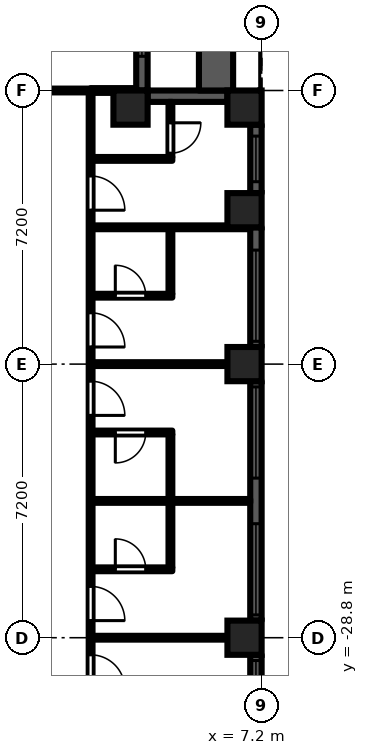
"""IFC4 building model, lengths in metres.
Left out: names, types, materials, properties, quantities, classifications, styles, units other than length and angle.
Written with IfcOpenShell. Run it as: python <this file> out.ifc"""

import sys

from ifc_helpers import new_model, si_unit, direction, frame, frame_2d, origin, origin_2d, place, context, subcontext, project, spatial, rectangle, extrude, element, fill, save


model = new_model("IFC4")
c1 = context("Model", 3, precision=1e-05, world=origin(), true_north=direction((0.0, 1.0)))
c2 = subcontext(c1, "Body", "Model", "MODEL_VIEW")
j1 = project(units=[si_unit("LENGTHUNIT", "METRE"), si_unit("PLANEANGLEUNIT", "RADIAN")], contexts=[c1])
p1 = place(None, origin())
s1 = spatial("IfcSite", under=j1, at=p1, CompositionType="ELEMENT")
p2 = place(p1, origin())
s2 = spatial("IfcBuilding", under=s1, at=p2, CompositionType="ELEMENT")
p3 = place(p2, frame((0.0, 0.0, 93.9)))
s3 = spatial("IfcBuildingStorey", under=s2, at=p3, CompositionType="ELEMENT", Elevation=93.9)
for number, where, z_axis, x_axis in (
    (1, (3.75, -14.85, 0.0), (0.0, 0.0, 1.0), (1.0, 0.0, 0.0)),
    (2, (6.75, -28.8, 0.0), (0.0, 0.0, 1.0), (1.0, 0.0, 0.0)),
    (3, (6.75, -21.6, 0.0), (0.0, 0.0, 1.0), (1.0, 0.0, 0.0)),
    (4, (6.75, -17.55, 0.0), (0.0, 0.0, 1.0), (1.0, 0.0, 0.0)),
    (5, (6.75, -14.85, 0.0), (0.0, 0.0, 1.0), (1.0, 0.0, 0.0)),
):
    element("IfcColumn", number, at=place(p3, frame(where, z_axis=z_axis, x_axis=x_axis)), inside=s3, PredefinedType="COLUMN", context=c2, shape_type="SweptSolid", body=[
        extrude(rectangle(XDim=0.9, YDim=0.9, at=origin_2d()), origin(), (0.0, 0.0, 1.0), 3.0),
    ])
p4 = place(p3, frame((7.05, -35.55, 0.0), z_axis=(0.0, 0.0, 1.0), x_axis=(0.0, 1.0, 0.0)))
e6 = element("IfcWall", 6, at=p4, inside=s3, PredefinedType="SOLIDWALL", context=c2, shape_type="SweptSolid", body=[
    extrude(rectangle(XDim=6.3, YDim=0.3, at=frame_2d((3.15, 0.0))), origin(), (0.0, 0.0, 1.0), 2.1),
])
p5 = place(p4, frame((3.75, 0.0, 0.2)))
e7 = element("IfcOpeningElement", 7, at=p5, cuts=e6, PredefinedType="OPENING", context=c2, shape_type="SweptSolid", body=[
    extrude(rectangle(XDim=2.4, YDim=1.85, at=frame_2d((1.2, 0.925))), frame((0.0, 0.16, 0.0), z_axis=(0.0, -1.0, 0.0), x_axis=(1.0, 0.0, 0.0)), (0.0, 0.0, 1.0), 0.32),
])
p6 = place(p3, frame((7.05, -28.35, 0.0), z_axis=(0.0, 0.0, 1.0), x_axis=(0.0, 1.0, 0.0)))
e8 = element("IfcWall", 8, at=p6, inside=s3, PredefinedType="SOLIDWALL", context=c2, shape_type="SweptSolid", body=[
    extrude(rectangle(XDim=6.3, YDim=0.3, at=frame_2d((3.15, 0.0))), origin(), (0.0, 0.0, 1.0), 2.1),
])
p7 = place(p6, frame((0.15, 0.0, 0.2)))
e9 = element("IfcOpeningElement", 9, at=p7, cuts=e8, PredefinedType="OPENING", context=c2, shape_type="SweptSolid", body=[
    extrude(rectangle(XDim=2.4, YDim=1.85, at=frame_2d((1.2, 0.925))), frame((0.0, 0.16, 0.0), z_axis=(0.0, -1.0, 0.0), x_axis=(1.0, 0.0, 0.0)), (0.0, 0.0, 1.0), 0.32),
])
p8 = place(p6, frame((3.75, 0.0, 0.2)))
e10 = element("IfcOpeningElement", 10, at=p8, cuts=e8, PredefinedType="OPENING", context=c2, shape_type="SweptSolid", body=[
    extrude(rectangle(XDim=2.4, YDim=1.85, at=frame_2d((1.2, 0.925))), frame((0.0, 0.16, 0.0), z_axis=(0.0, -1.0, 0.0), x_axis=(1.0, 0.0, 0.0)), (0.0, 0.0, 1.0), 0.32),
])
p9 = place(p3, frame((7.05, -21.15, 0.0), z_axis=(0.0, 0.0, 1.0), x_axis=(0.0, 1.0, 0.0)))
e11 = element("IfcWall", 11, at=p9, inside=s3, PredefinedType="SOLIDWALL", context=c2, shape_type="SweptSolid", body=[
    extrude(rectangle(XDim=3.15, YDim=0.3, at=frame_2d((1.575, 0.0))), origin(), (0.0, 0.0, 1.0), 2.1),
])
p10 = place(p9, frame((0.15, 0.0, 0.2)))
e12 = element("IfcOpeningElement", 12, at=p10, cuts=e11, PredefinedType="OPENING", context=c2, shape_type="SweptSolid", body=[
    extrude(rectangle(XDim=2.4, YDim=1.85, at=frame_2d((1.2, 0.925))), frame((0.0, 0.16, 0.0), z_axis=(0.0, -1.0, 0.0), x_axis=(1.0, 0.0, 0.0)), (0.0, 0.0, 1.0), 0.32),
])
p11 = place(p3, frame((7.05, -17.1, 0.0), z_axis=(0.0, 0.0, 1.0), x_axis=(0.0, 1.0, 0.0)))
e13 = element("IfcWall", 13, at=p11, inside=s3, PredefinedType="SOLIDWALL", context=c2, shape_type="SweptSolid", body=[
    extrude(rectangle(XDim=1.8, YDim=0.3, at=frame_2d((0.9, 0.0))), origin(), (0.0, 0.0, 1.0), 2.1),
])
p12 = place(p11, frame((0.3, 0.0, 0.2)))
e14 = element("IfcOpeningElement", 14, at=p12, cuts=e13, PredefinedType="OPENING", context=c2, shape_type="SweptSolid", body=[
    extrude(rectangle(XDim=1.2, YDim=1.85, at=frame_2d((0.6, 0.925))), frame((0.0, 0.16, 0.0), z_axis=(0.0, -1.0, 0.0), x_axis=(1.0, 0.0, 0.0)), (0.0, 0.0, 1.0), 0.32),
])
p13 = place(p3, frame((6.3, -14.55, 0.0), z_axis=(0.0, 0.0, 1.0), x_axis=(-1.0, 0.0, 0.0)))
e15 = element("IfcWall", 15, at=p13, inside=s3, PredefinedType="SOLIDWALL", context=c2, shape_type="SweptSolid", body=[
    extrude(rectangle(XDim=2.1, YDim=0.3, at=frame_2d((1.05, 0.0))), origin(), (0.0, 0.0, 1.0), 2.1),
])
p14 = place(p3, frame((4.05, -14.4, 0.0), z_axis=(0.0, 0.0, 1.0), x_axis=(0.0, 1.0, 0.0)))
e16 = element("IfcWall", 16, at=p14, inside=s3, PredefinedType="SOLIDWALL", context=c2, shape_type="SweptSolid", body=[
    extrude(rectangle(XDim=7.2, YDim=0.3, at=frame_2d((3.6, 0.0))), origin(), (0.0, 0.0, 1.0), 2.1),
])
p15 = place(p14, frame((3.0, 0.0, 0.0)))
e17 = element("IfcOpeningElement", 17, at=p15, cuts=e16, PredefinedType="OPENING", context=c2, shape_type="SweptSolid", body=[
    extrude(rectangle(XDim=1.2, YDim=2.05, at=frame_2d((0.6, 1.025))), frame((0.0, 0.16, 0.0), z_axis=(0.0, -1.0, 0.0), x_axis=(1.0, 0.0, 0.0)), (0.0, 0.0, 1.0), 0.32),
])
p16 = place(p14, frame((0.9, 0.0, 0.2)))
e18 = element("IfcOpeningElement", 18, at=p16, cuts=e16, PredefinedType="OPENING", context=c2, shape_type="SweptSolid", body=[
    extrude(rectangle(XDim=1.8, YDim=1.85, at=frame_2d((0.9, 0.925))), frame((0.0, 0.16, 0.0), z_axis=(0.0, -1.0, 0.0), x_axis=(1.0, 0.0, 0.0)), (0.0, 0.0, 1.0), 0.32),
])
p17 = place(p14, frame((4.5, 0.0, 0.2)))
e19 = element("IfcOpeningElement", 19, at=p17, cuts=e16, PredefinedType="OPENING", context=c2, shape_type="SweptSolid", body=[
    extrude(rectangle(XDim=1.8, YDim=1.85, at=frame_2d((0.9, 0.925))), frame((0.0, 0.16, 0.0), z_axis=(0.0, -1.0, 0.0), x_axis=(1.0, 0.0, 0.0)), (0.0, 0.0, 1.0), 0.32),
])
p18 = place(p3, frame((6.0, -14.4, 0.0), z_axis=(0.0, 0.0, 1.0), x_axis=(0.0, 1.0, 0.0)))
e20 = element("IfcWall", 20, at=p18, inside=s3, PredefinedType="PARAPET", context=c2, shape_type="SweptSolid", body=[
    extrude(rectangle(XDim=7.2, YDim=0.9, at=frame_2d((3.6, 0.0))), origin(), (0.0, 0.0, 1.0), 0.8),
])
p19 = place(p3, frame((1.275, -14.4, 0.0), z_axis=(0.0, 0.0, 1.0), x_axis=(1.0, 0.0, 0.0)))
e21 = element("IfcWall", 21, at=p19, inside=s3, PredefinedType="PARTITIONING", context=c2, shape_type="SweptSolid", body=[
    extrude(rectangle(XDim=1.425, YDim=0.1, at=frame_2d((0.712, 0.0))), origin(), (0.0, 0.0, 1.0), 2.575),
])
p20 = place(p3, frame((2.7, -32.35, 0.0), z_axis=(0.0, 0.0, 1.0), x_axis=(0.0, 1.0, 0.0)))
e22 = element("IfcWall", 22, at=p20, inside=s3, PredefinedType="PARTITIONING", context=c2, shape_type="SweptSolid", body=[
    extrude(rectangle(XDim=17.888, YDim=0.1, at=frame_2d((8.944, 0.0))), origin(), (0.0, 0.0, 1.0), 2.575),
])
p21 = place(p20, frame((2.2, 0.0, 0.0)))
e23 = element("IfcOpeningElement", 23, at=p21, cuts=e22, PredefinedType="OPENING", context=c2, shape_type="SweptSolid", body=[
    extrude(rectangle(XDim=0.9, YDim=2.1, at=frame_2d((0.45, 1.05))), frame((0.0, 0.06, 0.0), z_axis=(0.0, -1.0, 0.0), x_axis=(1.0, 0.0, 0.0)), (0.0, 0.0, 1.0), 0.12),
])
p22 = place(p20, frame((4.0, 0.0, 0.0)))
e24 = element("IfcOpeningElement", 24, at=p22, cuts=e22, PredefinedType="OPENING", context=c2, shape_type="SweptSolid", body=[
    extrude(rectangle(XDim=0.9, YDim=2.1, at=frame_2d((0.45, 1.05))), frame((0.0, 0.06, 0.0), z_axis=(0.0, -1.0, 0.0), x_axis=(1.0, 0.0, 0.0)), (0.0, 0.0, 1.0), 0.12),
])
p23 = place(p20, frame((9.4, 0.0, 0.0)))
e25 = element("IfcOpeningElement", 25, at=p23, cuts=e22, PredefinedType="OPENING", context=c2, shape_type="SweptSolid", body=[
    extrude(rectangle(XDim=0.9, YDim=2.1, at=frame_2d((0.45, 1.05))), frame((0.0, 0.06, 0.0), z_axis=(0.0, -1.0, 0.0), x_axis=(1.0, 0.0, 0.0)), (0.0, 0.0, 1.0), 0.12),
])
p24 = place(p20, frame((11.2, 0.0, 0.0)))
e26 = element("IfcOpeningElement", 26, at=p24, cuts=e22, PredefinedType="OPENING", context=c2, shape_type="SweptSolid", body=[
    extrude(rectangle(XDim=0.9, YDim=2.1, at=frame_2d((0.45, 1.05))), frame((0.0, 0.06, 0.0), z_axis=(0.0, -1.0, 0.0), x_axis=(1.0, 0.0, 0.0)), (0.0, 0.0, 1.0), 0.12),
])
p25 = place(p20, frame((14.8, 0.0, 0.0)))
e27 = element("IfcOpeningElement", 27, at=p25, cuts=e22, PredefinedType="OPENING", context=c2, shape_type="SweptSolid", body=[
    extrude(rectangle(XDim=0.9, YDim=2.1, at=frame_2d((0.45, 1.05))), frame((0.0, 0.06, 0.0), z_axis=(0.0, -1.0, 0.0), x_axis=(1.0, 0.0, 0.0)), (0.0, 0.0, 1.0), 0.12),
])
p26 = place(p3, frame((2.75, -28.8, 0.0), z_axis=(0.0, 0.0, 1.0), x_axis=(1.0, 0.0, 0.0)))
e28 = element("IfcWall", 28, at=p26, inside=s3, PredefinedType="PARTITIONING", context=c2, shape_type="SweptSolid", body=[
    extrude(rectangle(XDim=4.15, YDim=0.1, at=frame_2d((2.075, 0.0))), origin(), (0.0, 0.0, 1.0), 2.575),
])
p27 = place(p3, frame((2.75, -27.0, 0.0), z_axis=(0.0, 0.0, 1.0), x_axis=(1.0, 0.0, 0.0)))
e29 = element("IfcWall", 29, at=p27, inside=s3, PredefinedType="PARTITIONING", context=c2, shape_type="SweptSolid", body=[
    extrude(rectangle(XDim=2.1, YDim=0.1, at=frame_2d((1.05, 0.0))), origin(), (0.0, 0.0, 1.0), 2.575),
])
p28 = place(p27, frame((0.6, 0.0, 0.0)))
e30 = element("IfcOpeningElement", 30, at=p28, cuts=e29, PredefinedType="OPENING", context=c2, shape_type="SweptSolid", body=[
    extrude(rectangle(XDim=0.8, YDim=2.1, at=frame_2d((0.4, 1.05))), frame((0.0, 0.06, 0.0), z_axis=(0.0, -1.0, 0.0), x_axis=(1.0, 0.0, 0.0)), (0.0, 0.0, 1.0), 0.12),
])
p29 = place(p3, frame((2.75, -25.2, 0.0), z_axis=(0.0, 0.0, 1.0), x_axis=(1.0, 0.0, 0.0)))
e31 = element("IfcWall", 31, at=p29, inside=s3, PredefinedType="PARTITIONING", context=c2, shape_type="SweptSolid", body=[
    extrude(rectangle(XDim=4.15, YDim=0.1, at=frame_2d((2.075, 0.0))), origin(), (0.0, 0.0, 1.0), 2.575),
])
p30 = place(p3, frame((2.75, -23.4, 0.0), z_axis=(0.0, 0.0, 1.0), x_axis=(1.0, 0.0, 0.0)))
e32 = element("IfcWall", 32, at=p30, inside=s3, PredefinedType="PARTITIONING", context=c2, shape_type="SweptSolid", body=[
    extrude(rectangle(XDim=2.1, YDim=0.1, at=frame_2d((1.05, 0.0))), origin(), (0.0, 0.0, 1.0), 2.575),
])
p31 = place(p30, frame((0.6, 0.0, 0.0)))
e33 = element("IfcOpeningElement", 33, at=p31, cuts=e32, PredefinedType="OPENING", context=c2, shape_type="SweptSolid", body=[
    extrude(rectangle(XDim=0.8, YDim=2.1, at=frame_2d((0.4, 1.05))), frame((0.0, 0.06, 0.0), z_axis=(0.0, -1.0, 0.0), x_axis=(1.0, 0.0, 0.0)), (0.0, 0.0, 1.0), 0.12),
])
p32 = place(p3, frame((2.75, -21.6, 0.0), z_axis=(0.0, 0.0, 1.0), x_axis=(1.0, 0.0, 0.0)))
e34 = element("IfcWall", 34, at=p32, inside=s3, PredefinedType="PARTITIONING", context=c2, shape_type="SweptSolid", body=[
    extrude(rectangle(XDim=4.15, YDim=0.1, at=frame_2d((2.075, 0.0))), origin(), (0.0, 0.0, 1.0), 2.575),
])
p33 = place(p3, frame((2.75, -19.8, 0.0), z_axis=(0.0, 0.0, 1.0), x_axis=(1.0, 0.0, 0.0)))
e35 = element("IfcWall", 35, at=p33, inside=s3, PredefinedType="PARTITIONING", context=c2, shape_type="SweptSolid", body=[
    extrude(rectangle(XDim=2.1, YDim=0.1, at=frame_2d((1.05, 0.0))), origin(), (0.0, 0.0, 1.0), 2.575),
])
p34 = place(p33, frame((0.6, 0.0, 0.0)))
e36 = element("IfcOpeningElement", 36, at=p34, cuts=e35, PredefinedType="OPENING", context=c2, shape_type="SweptSolid", body=[
    extrude(rectangle(XDim=0.8, YDim=2.1, at=frame_2d((0.4, 1.05))), frame((0.0, 0.06, 0.0), z_axis=(0.0, -1.0, 0.0), x_axis=(1.0, 0.0, 0.0)), (0.0, 0.0, 1.0), 0.12),
])
p35 = place(p3, frame((2.75, -18.0, 0.0), z_axis=(0.0, 0.0, 1.0), x_axis=(1.0, 0.0, 0.0)))
e37 = element("IfcWall", 37, at=p35, inside=s3, PredefinedType="PARTITIONING", context=c2, shape_type="SweptSolid", body=[
    extrude(rectangle(XDim=4.15, YDim=0.1, at=frame_2d((2.075, 0.0))), origin(), (0.0, 0.0, 1.0), 2.575),
])
p36 = place(p3, frame((2.75, -16.2, 0.0), z_axis=(0.0, 0.0, 1.0), x_axis=(1.0, 0.0, 0.0)))
e38 = element("IfcWall", 38, at=p36, inside=s3, PredefinedType="PARTITIONING", context=c2, shape_type="SweptSolid", body=[
    extrude(rectangle(XDim=2.1, YDim=0.1, at=frame_2d((1.05, 0.0))), origin(), (0.0, 0.0, 1.0), 2.575),
])
p37 = place(p3, frame((2.7, -14.4, 0.0), z_axis=(0.0, 0.0, 1.0), x_axis=(1.0, 0.0, 0.0)))
e39 = element("IfcWall", 39, at=p37, inside=s3, PredefinedType="PARTITIONING", context=c2, shape_type="SweptSolid", body=[
    extrude(rectangle(XDim=1.2, YDim=0.125, at=frame_2d((0.6, 0.0))), origin(), (0.0, 0.0, 1.0), 2.575),
])
p38 = place(p3, frame((4.8, -26.95, 0.0), z_axis=(0.0, 0.0, 1.0), x_axis=(0.0, 1.0, 0.0)))
e40 = element("IfcWall", 40, at=p38, inside=s3, PredefinedType="PARTITIONING", context=c2, shape_type="SweptSolid", body=[
    extrude(rectangle(XDim=3.5, YDim=0.1, at=frame_2d((1.75, 0.0))), origin(), (0.0, 0.0, 1.0), 2.575),
])
p39 = place(p3, frame((4.8, -19.75, 0.0), z_axis=(0.0, 0.0, 1.0), x_axis=(0.0, 1.0, 0.0)))
e41 = element("IfcWall", 41, at=p39, inside=s3, PredefinedType="PARTITIONING", context=c2, shape_type="SweptSolid", body=[
    extrude(rectangle(XDim=1.7, YDim=0.1, at=frame_2d((0.85, 0.0))), origin(), (0.0, 0.0, 1.0), 2.575),
])
p40 = place(p3, frame((4.8, -16.15, 0.0), z_axis=(0.0, 0.0, 1.0), x_axis=(0.0, 1.0, 0.0)))
e42 = element("IfcWall", 42, at=p40, inside=s3, PredefinedType="PARTITIONING", context=c2, shape_type="SweptSolid", body=[
    extrude(rectangle(XDim=1.45, YDim=0.1, at=frame_2d((0.725, 0.0))), origin(), (0.0, 0.0, 1.0), 2.575),
])
p41 = place(p40, frame((0.1, 0.0, 0.0)))
e43 = element("IfcOpeningElement", 43, at=p41, cuts=e42, PredefinedType="OPENING", context=c2, shape_type="SweptSolid", body=[
    extrude(rectangle(XDim=0.8, YDim=2.1, at=frame_2d((0.4, 1.05))), frame((0.0, 0.06, 0.0), z_axis=(0.0, -1.0, 0.0), x_axis=(1.0, 0.0, 0.0)), (0.0, 0.0, 1.0), 0.12),
])
p42 = place(p5, origin())
e44 = element("IfcWindow", 44, at=p42, inside=s3, PartitioningType="SINGLE_PANEL", PredefinedType="WINDOW", context=c2, shape_type="SweptSolid", body=[
    extrude(rectangle(XDim=2.4, YDim=1.85, at=frame_2d((1.2, 0.925))), frame((0.0, 0.03, 0.0), z_axis=(0.0, -1.0, 0.0), x_axis=(1.0, 0.0, 0.0)), (0.0, 0.0, 1.0), 0.06),
])
fill(e7, e44)
p43 = place(p7, origin())
e45 = element("IfcWindow", 45, at=p43, inside=s3, PartitioningType="SINGLE_PANEL", PredefinedType="WINDOW", context=c2, shape_type="SweptSolid", body=[
    extrude(rectangle(XDim=2.4, YDim=1.85, at=frame_2d((1.2, 0.925))), frame((0.0, 0.03, 0.0), z_axis=(0.0, -1.0, 0.0), x_axis=(1.0, 0.0, 0.0)), (0.0, 0.0, 1.0), 0.06),
])
fill(e9, e45)
p44 = place(p8, origin())
e46 = element("IfcWindow", 46, at=p44, inside=s3, PartitioningType="SINGLE_PANEL", PredefinedType="WINDOW", context=c2, shape_type="SweptSolid", body=[
    extrude(rectangle(XDim=2.4, YDim=1.85, at=frame_2d((1.2, 0.925))), frame((0.0, 0.03, 0.0), z_axis=(0.0, -1.0, 0.0), x_axis=(1.0, 0.0, 0.0)), (0.0, 0.0, 1.0), 0.06),
])
fill(e10, e46)
p45 = place(p10, origin())
e47 = element("IfcWindow", 47, at=p45, inside=s3, PartitioningType="SINGLE_PANEL", PredefinedType="WINDOW", context=c2, shape_type="SweptSolid", body=[
    extrude(rectangle(XDim=2.4, YDim=1.85, at=frame_2d((1.2, 0.925))), frame((0.0, 0.03, 0.0), z_axis=(0.0, -1.0, 0.0), x_axis=(1.0, 0.0, 0.0)), (0.0, 0.0, 1.0), 0.06),
])
fill(e12, e47)
p46 = place(p12, origin())
e48 = element("IfcWindow", 48, at=p46, inside=s3, PartitioningType="SINGLE_PANEL", PredefinedType="WINDOW", context=c2, shape_type="SweptSolid", body=[
    extrude(rectangle(XDim=1.2, YDim=1.85, at=frame_2d((0.6, 0.925))), frame((0.0, 0.03, 0.0), z_axis=(0.0, -1.0, 0.0), x_axis=(1.0, 0.0, 0.0)), (0.0, 0.0, 1.0), 0.06),
])
fill(e14, e48)
p47 = place(p16, origin())
e49 = element("IfcWindow", 49, at=p47, inside=s3, PartitioningType="SINGLE_PANEL", PredefinedType="WINDOW", context=c2, shape_type="SweptSolid", body=[
    extrude(rectangle(XDim=1.8, YDim=1.85, at=frame_2d((0.9, 0.925))), frame((0.0, 0.03, 0.0), z_axis=(0.0, -1.0, 0.0), x_axis=(1.0, 0.0, 0.0)), (0.0, 0.0, 1.0), 0.06),
])
fill(e18, e49)
p48 = place(p21, frame((0.9, 0.0, 0.0), z_axis=(0.0, 0.0, 1.0), x_axis=(-1.0, 0.0, 0.0)))
e50 = element("IfcDoor", 50, at=p48, inside=s3, OperationType="SINGLE_SWING_RIGHT", PredefinedType="DOOR", context=c2, shape_type="SweptSolid", body=[
    extrude(rectangle(XDim=0.9, YDim=2.1, at=frame_2d((0.45, 1.05))), frame((0.0, 0.025, 0.0), z_axis=(0.0, -1.0, 0.0), x_axis=(1.0, 0.0, 0.0)), (0.0, 0.0, 1.0), 0.05),
])
fill(e23, e50)
p49 = place(p22, frame((0.9, 0.0, 0.0), z_axis=(0.0, 0.0, 1.0), x_axis=(-1.0, 0.0, 0.0)))
e51 = element("IfcDoor", 51, at=p49, inside=s3, OperationType="SINGLE_SWING_RIGHT", PredefinedType="DOOR", context=c2, shape_type="SweptSolid", body=[
    extrude(rectangle(XDim=0.9, YDim=2.1, at=frame_2d((0.45, 1.05))), frame((0.0, 0.025, 0.0), z_axis=(0.0, -1.0, 0.0), x_axis=(1.0, 0.0, 0.0)), (0.0, 0.0, 1.0), 0.05),
])
fill(e24, e51)
p50 = place(p23, frame((0.9, 0.0, 0.0), z_axis=(0.0, 0.0, 1.0), x_axis=(-1.0, 0.0, 0.0)))
e52 = element("IfcDoor", 52, at=p50, inside=s3, OperationType="SINGLE_SWING_RIGHT", PredefinedType="DOOR", context=c2, shape_type="SweptSolid", body=[
    extrude(rectangle(XDim=0.9, YDim=2.1, at=frame_2d((0.45, 1.05))), frame((0.0, 0.025, 0.0), z_axis=(0.0, -1.0, 0.0), x_axis=(1.0, 0.0, 0.0)), (0.0, 0.0, 1.0), 0.05),
])
fill(e25, e52)
p51 = place(p24, frame((0.9, 0.0, 0.0), z_axis=(0.0, 0.0, 1.0), x_axis=(-1.0, 0.0, 0.0)))
e53 = element("IfcDoor", 53, at=p51, inside=s3, OperationType="SINGLE_SWING_RIGHT", PredefinedType="DOOR", context=c2, shape_type="SweptSolid", body=[
    extrude(rectangle(XDim=0.9, YDim=2.1, at=frame_2d((0.45, 1.05))), frame((0.0, 0.025, 0.0), z_axis=(0.0, -1.0, 0.0), x_axis=(1.0, 0.0, 0.0)), (0.0, 0.0, 1.0), 0.05),
])
fill(e26, e53)
p52 = place(p25, frame((0.9, 0.0, 0.0), z_axis=(0.0, 0.0, 1.0), x_axis=(-1.0, 0.0, 0.0)))
e54 = element("IfcDoor", 54, at=p52, inside=s3, OperationType="SINGLE_SWING_RIGHT", PredefinedType="DOOR", context=c2, shape_type="SweptSolid", body=[
    extrude(rectangle(XDim=0.9, YDim=2.1, at=frame_2d((0.45, 1.05))), frame((0.0, 0.025, 0.0), z_axis=(0.0, -1.0, 0.0), x_axis=(1.0, 0.0, 0.0)), (0.0, 0.0, 1.0), 0.05),
])
fill(e27, e54)
p53 = place(p41, frame((0.8, 0.0, 0.0), z_axis=(0.0, 0.0, 1.0), x_axis=(-1.0, 0.0, 0.0)))
e55 = element("IfcDoor", 55, at=p53, inside=s3, OperationType="SINGLE_SWING_LEFT", PredefinedType="DOOR", context=c2, shape_type="SweptSolid", body=[
    extrude(rectangle(XDim=0.8, YDim=2.1, at=frame_2d((0.4, 1.05))), frame((0.0, 0.025, 0.0), z_axis=(0.0, -1.0, 0.0), x_axis=(1.0, 0.0, 0.0)), (0.0, 0.0, 1.0), 0.05),
])
fill(e43, e55)
p54 = place(p34, origin())
e56 = element("IfcDoor", 56, at=p54, inside=s3, OperationType="SINGLE_SWING_LEFT", PredefinedType="DOOR", context=c2, shape_type="SweptSolid", body=[
    extrude(rectangle(XDim=0.8, YDim=2.1, at=frame_2d((0.4, 1.05))), frame((0.0, 0.025, 0.0), z_axis=(0.0, -1.0, 0.0), x_axis=(1.0, 0.0, 0.0)), (0.0, 0.0, 1.0), 0.05),
])
fill(e36, e56)
p55 = place(p31, frame((0.8, 0.0, 0.0), z_axis=(0.0, 0.0, 1.0), x_axis=(-1.0, 0.0, 0.0)))
e57 = element("IfcDoor", 57, at=p55, inside=s3, OperationType="SINGLE_SWING_RIGHT", PredefinedType="DOOR", context=c2, shape_type="SweptSolid", body=[
    extrude(rectangle(XDim=0.8, YDim=2.1, at=frame_2d((0.4, 1.05))), frame((0.0, 0.025, 0.0), z_axis=(0.0, -1.0, 0.0), x_axis=(1.0, 0.0, 0.0)), (0.0, 0.0, 1.0), 0.05),
])
fill(e33, e57)
p56 = place(p28, origin())
e58 = element("IfcDoor", 58, at=p56, inside=s3, OperationType="SINGLE_SWING_LEFT", PredefinedType="DOOR", context=c2, shape_type="SweptSolid", body=[
    extrude(rectangle(XDim=0.8, YDim=2.1, at=frame_2d((0.4, 1.05))), frame((0.0, 0.025, 0.0), z_axis=(0.0, -1.0, 0.0), x_axis=(1.0, 0.0, 0.0)), (0.0, 0.0, 1.0), 0.05),
])
fill(e30, e58)
save(model, sys.argv[1])
